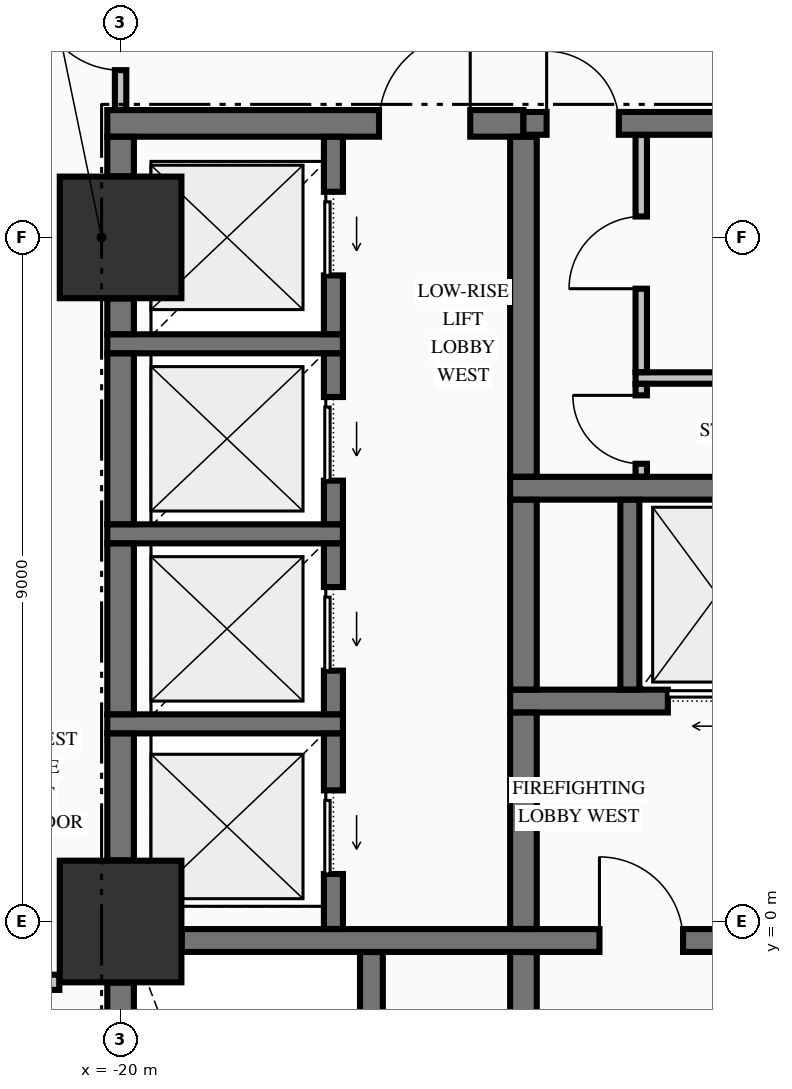
"""IFC4 building model, lengths in metres.
Left out: names, types, materials, properties, quantities, classifications, styles, units other than length and angle.
Written with IfcOpenShell. Run it as: python <this file> out.ifc"""

import sys

from ifc_helpers import new_model, si_unit, direction, frame, frame_2d, origin, origin_2d, place, context, subcontext, project, spatial, rectangle, extrude, element, fill, save


model = new_model("IFC4")
c1 = context("Model", 3, precision=1e-05, world=origin(), true_north=direction((0.0, 1.0)))
c2 = subcontext(c1, "Body", "Model", "MODEL_VIEW")
j1 = project(units=[si_unit("LENGTHUNIT", "METRE"), si_unit("PLANEANGLEUNIT", "RADIAN")], contexts=[c1])
p1 = place(None, origin())
s1 = spatial("IfcSite", under=j1, at=p1, CompositionType="ELEMENT")
p2 = place(p1, origin())
s2 = spatial("IfcBuilding", under=s1, at=p2, CompositionType="ELEMENT")
p3 = place(p2, frame((0.0, 0.0, 5.44)))
s3 = spatial("IfcBuildingStorey", under=s2, at=p3, CompositionType="ELEMENT", Elevation=5.44)
for number, where, z_axis, x_axis in (
    (1, (-20.0, 0.0, 0.0), (0.0, 0.0, 1.0), (1.0, 0.0, 0.0)),
    (2, (-20.0, 9.0, 0.0), (0.0, 0.0, 1.0), (1.0, 0.0, 0.0)),
):
    element("IfcColumn", number, at=place(p3, frame(where, z_axis=z_axis, x_axis=x_axis)), inside=s3, PredefinedType="COLUMN", context=c2, shape_type="SweptSolid", body=[
        extrude(rectangle(XDim=1.6, YDim=1.6, at=origin_2d()), origin(), (0.0, 0.0, 1.0), 5.09),
    ])
p4 = place(p3, frame((-19.196, -0.25, 0.0), z_axis=(0.0, 0.0, 1.0), x_axis=(1.0, 0.0, 0.0)))
e3 = element("IfcWall", 3, at=p4, inside=s3, PredefinedType="SHEAR", context=c2, shape_type="SweptSolid", body=[
    extrude(rectangle(XDim=7.392, YDim=0.3, at=frame_2d((3.696, 0.0))), origin(), (0.0, 0.0, 1.0), 5.09),
])
p5 = place(p4, frame((5.496, 0.0, 0.0)))
e4 = element("IfcOpeningElement", 4, at=p5, cuts=e3, PredefinedType="OPENING", context=c2, shape_type="SweptSolid", body=[
    extrude(rectangle(XDim=1.1, YDim=2.15, at=frame_2d((0.55, 1.075))), frame((0.0, 0.16, 0.0), z_axis=(0.0, -1.0, 0.0), x_axis=(1.0, 0.0, 0.0)), (0.0, 0.0, 1.0), 0.32),
])
p6 = place(p3, frame((-20.175, 2.6, 0.0), z_axis=(0.0, 0.0, 1.0), x_axis=(1.0, 0.0, 0.0)))
e5 = element("IfcWall", 5, at=p6, inside=s3, PredefinedType="SOLIDWALL", context=c2, shape_type="SweptSolid", body=[
    extrude(rectangle(XDim=3.1, YDim=0.25, at=frame_2d((1.55, 0.0))), origin(), (0.0, 0.0, 1.0), 5.09),
])
p7 = place(p3, frame((-14.875, 2.9, 0.0), z_axis=(0.0, 0.0, 1.0), x_axis=(1.0, 0.0, 0.0)))
e6 = element("IfcWall", 6, at=p7, inside=s3, PredefinedType="SHEAR", context=c2, shape_type="SweptSolid", body=[
    extrude(rectangle(XDim=4.025, YDim=0.3, at=frame_2d((2.012, 0.0))), origin(), (0.0, 0.0, 1.0), 5.09),
])
p8 = place(p7, frame((2.075, 0.0, 0.0)))
e7 = element("IfcOpeningElement", 7, at=p8, cuts=e6, PredefinedType="OPENING", context=c2, shape_type="SweptSolid", body=[
    extrude(rectangle(XDim=1.1, YDim=2.2, at=frame_2d((0.55, 1.1))), frame((0.0, 0.16, 0.0), z_axis=(0.0, -1.0, 0.0), x_axis=(1.0, 0.0, 0.0)), (0.0, 0.0, 1.0), 0.32),
])
p9 = place(p3, frame((-20.175, 5.1, 0.0), z_axis=(0.0, 0.0, 1.0), x_axis=(1.0, 0.0, 0.0)))
e8 = element("IfcWall", 8, at=p9, inside=s3, PredefinedType="SOLIDWALL", context=c2, shape_type="SweptSolid", body=[
    extrude(rectangle(XDim=3.1, YDim=0.25, at=frame_2d((1.55, 0.0))), origin(), (0.0, 0.0, 1.0), 5.09),
])
p10 = place(p3, frame((-14.875, 5.7, 0.0), z_axis=(0.0, 0.0, 1.0), x_axis=(1.0, 0.0, 0.0)))
e9 = element("IfcWall", 9, at=p10, inside=s3, PredefinedType="SHEAR", context=c2, shape_type="SweptSolid", body=[
    extrude(rectangle(XDim=4.025, YDim=0.3, at=frame_2d((2.012, 0.0))), origin(), (0.0, 0.0, 1.0), 5.09),
])
p11 = place(p3, frame((-20.175, 7.6, 0.0), z_axis=(0.0, 0.0, 1.0), x_axis=(1.0, 0.0, 0.0)))
e10 = element("IfcWall", 10, at=p11, inside=s3, PredefinedType="SOLIDWALL", context=c2, shape_type="SweptSolid", body=[
    extrude(rectangle(XDim=3.1, YDim=0.25, at=frame_2d((1.55, 0.0))), origin(), (0.0, 0.0, 1.0), 5.09),
])
p12 = place(p3, frame((-20.175, 10.5, 0.0), z_axis=(0.0, 0.0, 1.0), x_axis=(1.0, 0.0, 0.0)))
e11 = element("IfcWall", 11, at=p12, inside=s3, PredefinedType="SHEAR", context=c2, shape_type="SweptSolid", body=[
    extrude(rectangle(XDim=5.475, YDim=0.35, at=frame_2d((2.738, 0.0))), origin(), (0.0, 0.0, 1.0), 5.09),
])
p13 = place(p12, frame((3.575, 0.0, 0.0)))
e12 = element("IfcOpeningElement", 12, at=p13, cuts=e11, PredefinedType="OPENING", context=c2, shape_type="SweptSolid", body=[
    extrude(rectangle(XDim=1.2, YDim=2.15, at=frame_2d((0.6, 1.075))), frame((0.0, 0.185, 0.0), z_axis=(0.0, -1.0, 0.0), x_axis=(1.0, 0.0, 0.0)), (0.0, 0.0, 1.0), 0.37),
])
p14 = place(p3, frame((-14.7, 10.5, 0.0), z_axis=(0.0, 0.0, 1.0), x_axis=(1.0, 0.0, 0.0)))
e13 = element("IfcWall", 13, at=p14, inside=s3, PredefinedType="SHEAR", context=c2, shape_type="SweptSolid", body=[
    extrude(rectangle(XDim=3.85, YDim=0.3, at=frame_2d((1.925, 0.0))), origin(), (0.0, 0.0, 1.0), 5.09),
])
p15 = place(p14, frame((0.305, 0.0, 0.0)))
e14 = element("IfcOpeningElement", 14, at=p15, cuts=e13, PredefinedType="OPENING", context=c2, shape_type="SweptSolid", body=[
    extrude(rectangle(XDim=0.95, YDim=2.15, at=frame_2d((0.475, 1.075))), frame((0.0, 0.16, 0.0), z_axis=(0.0, -1.0, 0.0), x_axis=(1.0, 0.0, 0.0)), (0.0, 0.0, 1.0), 0.32),
])
p16 = place(p3, frame((-22.475, -0.8, 0.0), z_axis=(0.0, 0.0, 1.0), x_axis=(1.0, 0.0, 0.0)))
e15 = element("IfcWall", 15, at=p16, inside=s3, PredefinedType="PARTITIONING", context=c2, shape_type="SweptSolid", body=[
    extrude(rectangle(XDim=1.669, YDim=0.2, at=frame_2d((0.834, 0.0))), origin(), (0.0, 0.0, 1.0), 5.09),
])
p17 = place(p16, frame((0.425, 0.0, 0.0)))
e16 = element("IfcOpeningElement", 16, at=p17, cuts=e15, PredefinedType="OPENING", context=c2, shape_type="SweptSolid", body=[
    extrude(rectangle(XDim=1.0, YDim=2.15, at=frame_2d((0.5, 1.075))), frame((0.0, 0.11, 0.0), z_axis=(0.0, -1.0, 0.0), x_axis=(1.0, 0.0, 0.0)), (0.0, 0.0, 1.0), 0.22),
])
p18 = place(p3, frame((-13.225, 7.15, 0.0), z_axis=(0.0, 0.0, 1.0), x_axis=(1.0, 0.0, 0.0)))
e17 = element("IfcWall", 17, at=p18, inside=s3, PredefinedType="PARTITIONING", context=c2, shape_type="SweptSolid", body=[
    extrude(rectangle(XDim=2.072, YDim=0.15, at=frame_2d((1.036, 0.0))), origin(), (0.0, 0.0, 1.0), 5.09),
])
p19 = place(p3, frame((-20.0, -8.196, 0.0), z_axis=(0.0, 0.0, 1.0), x_axis=(0.0, 1.0, 0.0)))
e18 = element("IfcWall", 18, at=p19, inside=s3, PredefinedType="SHEAR", context=c2, shape_type="SweptSolid", body=[
    extrude(rectangle(XDim=7.392, YDim=0.35, at=frame_2d((3.696, 0.0))), origin(), (0.0, 0.0, 1.0), 5.09),
])
p20 = place(p3, frame((-20.0, 0.804, 0.0), z_axis=(0.0, 0.0, 1.0), x_axis=(0.0, 1.0, 0.0)))
e19 = element("IfcWall", 19, at=p20, inside=s3, PredefinedType="SHEAR", context=c2, shape_type="SweptSolid", body=[
    extrude(rectangle(XDim=1.669, YDim=0.35, at=frame_2d((0.834, 0.0))), origin(), (0.0, 0.0, 1.0), 5.09),
])
for number, where, z_axis, x_axis in (
    (20, (-20.0, 2.727, 0.0), (0.0, 0.0, 1.0), (0.0, 1.0, 0.0)),
    (21, (-20.0, 5.227, 0.0), (0.0, 0.0, 1.0), (0.0, 1.0, 0.0)),
):
    element("IfcWall", number, at=place(p3, frame(where, z_axis=z_axis, x_axis=x_axis)), inside=s3, PredefinedType="SHEAR", context=c2, shape_type="SweptSolid", body=[
        extrude(rectangle(XDim=2.246, YDim=0.35, at=frame_2d((1.123, 0.0))), origin(), (0.0, 0.0, 1.0), 5.09),
    ])
p21 = place(p3, frame((-20.0, 7.727, 0.0), z_axis=(0.0, 0.0, 1.0), x_axis=(0.0, 1.0, 0.0)))
e22 = element("IfcWall", 22, at=p21, inside=s3, PredefinedType="SHEAR", context=c2, shape_type="SweptSolid", body=[
    extrude(rectangle(XDim=0.469, YDim=0.35, at=frame_2d((0.234, 0.0))), origin(), (0.0, 0.0, 1.0), 5.09),
])
p22 = place(p3, frame((-20.0, 9.804, 0.0), z_axis=(0.0, 0.0, 1.0), x_axis=(0.0, 1.0, 0.0)))
e23 = element("IfcWall", 23, at=p22, inside=s3, PredefinedType="SHEAR", context=c2, shape_type="SweptSolid", body=[
    extrude(rectangle(XDim=0.519, YDim=0.35, at=frame_2d((0.26, 0.0))), origin(), (0.0, 0.0, 1.0), 5.09),
])
p23 = place(p3, frame((-17.2, -0.098, 0.0), z_axis=(0.0, 0.0, 1.0), x_axis=(0.0, 1.0, 0.0)))
e24 = element("IfcWall", 24, at=p23, inside=s3, PredefinedType="SOLIDWALL", context=c2, shape_type="SweptSolid", body=[
    extrude(rectangle(XDim=2.571, YDim=0.25, at=frame_2d((1.285, 0.0))), origin(), (0.0, 0.0, 1.0), 5.09),
])
p24 = place(p23, frame((0.723, 0.0, 0.0)))
e25 = element("IfcOpeningElement", 25, at=p24, cuts=e24, PredefinedType="OPENING", context=c2, shape_type="SweptSolid", body=[
    extrude(rectangle(XDim=1.1, YDim=2.2, at=frame_2d((0.55, 1.1))), frame((0.0, 0.135, 0.0), z_axis=(0.0, -1.0, 0.0), x_axis=(1.0, 0.0, 0.0)), (0.0, 0.0, 1.0), 0.27),
])
p25 = place(p3, frame((-17.2, 2.727, 0.0), z_axis=(0.0, 0.0, 1.0), x_axis=(0.0, 1.0, 0.0)))
e26 = element("IfcWall", 26, at=p25, inside=s3, PredefinedType="SOLIDWALL", context=c2, shape_type="SweptSolid", body=[
    extrude(rectangle(XDim=2.246, YDim=0.25, at=frame_2d((1.123, 0.0))), origin(), (0.0, 0.0, 1.0), 5.09),
])
p26 = place(p25, frame((0.573, 0.0, 0.0)))
e27 = element("IfcOpeningElement", 27, at=p26, cuts=e26, PredefinedType="OPENING", context=c2, shape_type="SweptSolid", body=[
    extrude(rectangle(XDim=1.1, YDim=2.2, at=frame_2d((0.55, 1.1))), frame((0.0, 0.135, 0.0), z_axis=(0.0, -1.0, 0.0), x_axis=(1.0, 0.0, 0.0)), (0.0, 0.0, 1.0), 0.27),
])
p27 = place(p3, frame((-17.2, 5.227, 0.0), z_axis=(0.0, 0.0, 1.0), x_axis=(0.0, 1.0, 0.0)))
e28 = element("IfcWall", 28, at=p27, inside=s3, PredefinedType="SOLIDWALL", context=c2, shape_type="SweptSolid", body=[
    extrude(rectangle(XDim=2.246, YDim=0.25, at=frame_2d((1.123, 0.0))), origin(), (0.0, 0.0, 1.0), 5.09),
])
p28 = place(p27, frame((0.573, 0.0, 0.0)))
e29 = element("IfcOpeningElement", 29, at=p28, cuts=e28, PredefinedType="OPENING", context=c2, shape_type="SweptSolid", body=[
    extrude(rectangle(XDim=1.1, YDim=2.2, at=frame_2d((0.55, 1.1))), frame((0.0, 0.135, 0.0), z_axis=(0.0, -1.0, 0.0), x_axis=(1.0, 0.0, 0.0)), (0.0, 0.0, 1.0), 0.27),
])
p29 = place(p3, frame((-17.2, 7.727, 0.0), z_axis=(0.0, 0.0, 1.0), x_axis=(0.0, 1.0, 0.0)))
e30 = element("IfcWall", 30, at=p29, inside=s3, PredefinedType="SOLIDWALL", context=c2, shape_type="SweptSolid", body=[
    extrude(rectangle(XDim=2.596, YDim=0.25, at=frame_2d((1.298, 0.0))), origin(), (0.0, 0.0, 1.0), 5.09),
])
p30 = place(p29, frame((0.773, 0.0, 0.0)))
e31 = element("IfcOpeningElement", 31, at=p30, cuts=e30, PredefinedType="OPENING", context=c2, shape_type="SweptSolid", body=[
    extrude(rectangle(XDim=1.1, YDim=2.2, at=frame_2d((0.55, 1.1))), frame((0.0, 0.135, 0.0), z_axis=(0.0, -1.0, 0.0), x_axis=(1.0, 0.0, 0.0)), (0.0, 0.0, 1.0), 0.27),
])
p31 = place(p3, frame((-16.7, -9.773, 0.0), z_axis=(0.0, 0.0, 1.0), x_axis=(0.0, 1.0, 0.0)))
e32 = element("IfcWall", 32, at=p31, inside=s3, PredefinedType="SHEAR", context=c2, shape_type="SweptSolid", body=[
    extrude(rectangle(XDim=9.371, YDim=0.3, at=frame_2d((4.686, 0.0))), origin(), (0.0, 0.0, 1.0), 5.09),
])
p32 = place(p3, frame((-14.7, -9.773, 0.0), z_axis=(0.0, 0.0, 1.0), x_axis=(0.0, 1.0, 0.0)))
e33 = element("IfcWall", 33, at=p32, inside=s3, PredefinedType="SHEAR", context=c2, shape_type="SweptSolid", body=[
    extrude(rectangle(XDim=9.371, YDim=0.35, at=frame_2d((4.686, 0.0))), origin(), (0.0, 0.0, 1.0), 5.09),
])
p33 = place(p3, frame((-14.7, -0.098, 0.0), z_axis=(0.0, 0.0, 1.0), x_axis=(0.0, 1.0, 0.0)))
e34 = element("IfcWall", 34, at=p33, inside=s3, PredefinedType="SHEAR", context=c2, shape_type="SweptSolid", body=[
    extrude(rectangle(XDim=2.846, YDim=0.35, at=frame_2d((1.423, 0.0))), origin(), (0.0, 0.0, 1.0), 5.09),
])
p34 = place(p3, frame((-14.7, 3.052, 0.0), z_axis=(0.0, 0.0, 1.0), x_axis=(0.0, 1.0, 0.0)))
e35 = element("IfcWall", 35, at=p34, inside=s3, PredefinedType="SHEAR", context=c2, shape_type="SweptSolid", body=[
    extrude(rectangle(XDim=2.496, YDim=0.35, at=frame_2d((1.248, 0.0))), origin(), (0.0, 0.0, 1.0), 5.09),
])
p35 = place(p3, frame((-14.7, 5.852, 0.0), z_axis=(0.0, 0.0, 1.0), x_axis=(0.0, 1.0, 0.0)))
e36 = element("IfcWall", 36, at=p35, inside=s3, PredefinedType="SHEAR", context=c2, shape_type="SweptSolid", body=[
    extrude(rectangle(XDim=4.471, YDim=0.35, at=frame_2d((2.235, 0.0))), origin(), (0.0, 0.0, 1.0), 5.09),
])
p36 = place(p3, frame((-13.3, 3.052, 0.0), z_axis=(0.0, 0.0, 1.0), x_axis=(0.0, 1.0, 0.0)))
e37 = element("IfcWall", 37, at=p36, inside=s3, PredefinedType="SOLIDWALL", context=c2, shape_type="SweptSolid", body=[
    extrude(rectangle(XDim=2.496, YDim=0.25, at=frame_2d((1.248, 0.0))), origin(), (0.0, 0.0, 1.0), 5.09),
])
p37 = place(p3, frame((-20.0, 10.678, 0.0), z_axis=(0.0, 0.0, 1.0), x_axis=(0.0, 1.0, 0.0)))
e38 = element("IfcWall", 38, at=p37, inside=s3, PredefinedType="PARTITIONING", context=c2, shape_type="SweptSolid", body=[
    extrude(rectangle(XDim=2.244, YDim=0.15, at=frame_2d((1.122, 0.0))), origin(), (0.0, 0.0, 1.0), 4.132),
])
p38 = place(p37, frame((0.522, 0.0, 0.0)))
e39 = element("IfcOpeningElement", 39, at=p38, cuts=e38, PredefinedType="OPENING", context=c2, shape_type="SweptSolid", body=[
    extrude(rectangle(XDim=1.1, YDim=2.15, at=frame_2d((0.55, 1.075))), frame((0.0, 0.085, 0.0), z_axis=(0.0, -1.0, 0.0), x_axis=(1.0, 0.0, 0.0)), (0.0, 0.0, 1.0), 0.17),
])
p39 = place(p3, frame((-13.15, 5.853, 0.0), z_axis=(0.0, 0.0, 1.0), x_axis=(0.0, 1.0, 0.0)))
e40 = element("IfcWall", 40, at=p39, inside=s3, PredefinedType="PARTITIONING", context=c2, shape_type="SweptSolid", body=[
    extrude(rectangle(XDim=1.219, YDim=0.15, at=frame_2d((0.609, 0.0))), origin(), (0.0, 0.0, 1.0), 5.09),
])
p40 = place(p39, frame((0.169, 0.0, 0.0)))
e41 = element("IfcOpeningElement", 41, at=p40, cuts=e40, PredefinedType="OPENING", context=c2, shape_type="SweptSolid", body=[
    extrude(rectangle(XDim=0.9, YDim=2.15, at=frame_2d((0.45, 1.075))), frame((0.0, 0.085, 0.0), z_axis=(0.0, -1.0, 0.0), x_axis=(1.0, 0.0, 0.0)), (0.0, 0.0, 1.0), 0.17),
])
p41 = place(p3, frame((-13.15, 7.228, 0.0), z_axis=(0.0, 0.0, 1.0), x_axis=(0.0, 1.0, 0.0)))
e42 = element("IfcWall", 42, at=p41, inside=s3, PredefinedType="PARTITIONING", context=c2, shape_type="SweptSolid", body=[
    extrude(rectangle(XDim=3.119, YDim=0.15, at=frame_2d((1.56, 0.0))), origin(), (0.0, 0.0, 1.0), 5.09),
])
p42 = place(p41, frame((1.097, 0.0, 0.0)))
e43 = element("IfcOpeningElement", 43, at=p42, cuts=e42, PredefinedType="OPENING", context=c2, shape_type="SweptSolid", body=[
    extrude(rectangle(XDim=0.95, YDim=2.15, at=frame_2d((0.475, 1.075))), frame((0.0, 0.085, 0.0), z_axis=(0.0, -1.0, 0.0), x_axis=(1.0, 0.0, 0.0)), (0.0, 0.0, 1.0), 0.17),
])
p43 = place(p5, origin())
e44 = element("IfcDoor", 44, at=p43, inside=s3, OperationType="SINGLE_SWING_LEFT", PredefinedType="DOOR", context=c2, shape_type="SweptSolid", body=[
    extrude(rectangle(XDim=1.1, YDim=2.15, at=frame_2d((0.55, 1.075))), frame((0.0, 0.025, 0.0), z_axis=(0.0, -1.0, 0.0), x_axis=(1.0, 0.0, 0.0)), (0.0, 0.0, 1.0), 0.05),
])
fill(e4, e44)
p44 = place(p8, origin())
e45 = element("IfcDoor", 45, at=p44, inside=s3, OperationType="SLIDING_TO_LEFT", PredefinedType="DOOR", context=c2, shape_type="SweptSolid", body=[
    extrude(rectangle(XDim=1.1, YDim=2.2, at=frame_2d((0.55, 1.1))), frame((0.0, 0.025, 0.0), z_axis=(0.0, -1.0, 0.0), x_axis=(1.0, 0.0, 0.0)), (0.0, 0.0, 1.0), 0.05),
])
fill(e7, e45)
p45 = place(p15, origin())
e46 = element("IfcDoor", 46, at=p45, inside=s3, OperationType="SINGLE_SWING_LEFT", PredefinedType="DOOR", context=c2, shape_type="SweptSolid", body=[
    extrude(rectangle(XDim=0.95, YDim=2.15, at=frame_2d((0.475, 1.075))), frame((0.0, 0.025, 0.0), z_axis=(0.0, -1.0, 0.0), x_axis=(1.0, 0.0, 0.0)), (0.0, 0.0, 1.0), 0.05),
])
fill(e14, e46)
p46 = place(p40, origin())
e47 = element("IfcDoor", 47, at=p46, inside=s3, OperationType="SINGLE_SWING_RIGHT", PredefinedType="DOOR", context=c2, shape_type="SweptSolid", body=[
    extrude(rectangle(XDim=0.9, YDim=2.15, at=frame_2d((0.45, 1.075))), frame((0.0, 0.025, 0.0), z_axis=(0.0, -1.0, 0.0), x_axis=(1.0, 0.0, 0.0)), (0.0, 0.0, 1.0), 0.05),
])
fill(e41, e47)
p47 = place(p42, origin())
e48 = element("IfcDoor", 48, at=p47, inside=s3, OperationType="SINGLE_SWING_LEFT", PredefinedType="DOOR", context=c2, shape_type="SweptSolid", body=[
    extrude(rectangle(XDim=0.95, YDim=2.15, at=frame_2d((0.475, 1.075))), frame((0.0, 0.025, 0.0), z_axis=(0.0, -1.0, 0.0), x_axis=(1.0, 0.0, 0.0)), (0.0, 0.0, 1.0), 0.05),
])
fill(e43, e48)
p48 = place(p13, origin())
e49 = element("IfcDoor", 49, at=p48, inside=s3, OperationType="SINGLE_SWING_RIGHT", PredefinedType="DOOR", context=c2, shape_type="SweptSolid", body=[
    extrude(rectangle(XDim=1.2, YDim=2.15, at=frame_2d((0.6, 1.075))), frame((0.0, 0.025, 0.0), z_axis=(0.0, -1.0, 0.0), x_axis=(1.0, 0.0, 0.0)), (0.0, 0.0, 1.0), 0.05),
])
fill(e12, e49)
p49 = place(p24, origin())
e50 = element("IfcDoor", 50, at=p49, inside=s3, OperationType="SLIDING_TO_LEFT", PredefinedType="DOOR", context=c2, shape_type="SweptSolid", body=[
    extrude(rectangle(XDim=1.1, YDim=2.2, at=frame_2d((0.55, 1.1))), frame((0.0, 0.025, 0.0), z_axis=(0.0, -1.0, 0.0), x_axis=(1.0, 0.0, 0.0)), (0.0, 0.0, 1.0), 0.05),
])
fill(e25, e50)
p50 = place(p26, origin())
e51 = element("IfcDoor", 51, at=p50, inside=s3, OperationType="SLIDING_TO_LEFT", PredefinedType="DOOR", context=c2, shape_type="SweptSolid", body=[
    extrude(rectangle(XDim=1.1, YDim=2.2, at=frame_2d((0.55, 1.1))), frame((0.0, 0.025, 0.0), z_axis=(0.0, -1.0, 0.0), x_axis=(1.0, 0.0, 0.0)), (0.0, 0.0, 1.0), 0.05),
])
fill(e27, e51)
p51 = place(p28, origin())
e52 = element("IfcDoor", 52, at=p51, inside=s3, OperationType="SLIDING_TO_LEFT", PredefinedType="DOOR", context=c2, shape_type="SweptSolid", body=[
    extrude(rectangle(XDim=1.1, YDim=2.2, at=frame_2d((0.55, 1.1))), frame((0.0, 0.025, 0.0), z_axis=(0.0, -1.0, 0.0), x_axis=(1.0, 0.0, 0.0)), (0.0, 0.0, 1.0), 0.05),
])
fill(e29, e52)
p52 = place(p30, origin())
e53 = element("IfcDoor", 53, at=p52, inside=s3, OperationType="SLIDING_TO_LEFT", PredefinedType="DOOR", context=c2, shape_type="SweptSolid", body=[
    extrude(rectangle(XDim=1.1, YDim=2.2, at=frame_2d((0.55, 1.1))), frame((0.0, 0.025, 0.0), z_axis=(0.0, -1.0, 0.0), x_axis=(1.0, 0.0, 0.0)), (0.0, 0.0, 1.0), 0.05),
])
fill(e31, e53)
p53 = place(p38, origin())
e54 = element("IfcDoor", 54, at=p53, inside=s3, OperationType="SINGLE_SWING_RIGHT", PredefinedType="DOOR", context=c2, shape_type="SweptSolid", body=[
    extrude(rectangle(XDim=1.1, YDim=2.15, at=frame_2d((0.55, 1.075))), frame((0.0, 0.025, 0.0), z_axis=(0.0, -1.0, 0.0), x_axis=(1.0, 0.0, 0.0)), (0.0, 0.0, 1.0), 0.05),
])
fill(e39, e54)
save(model, sys.argv[1])
